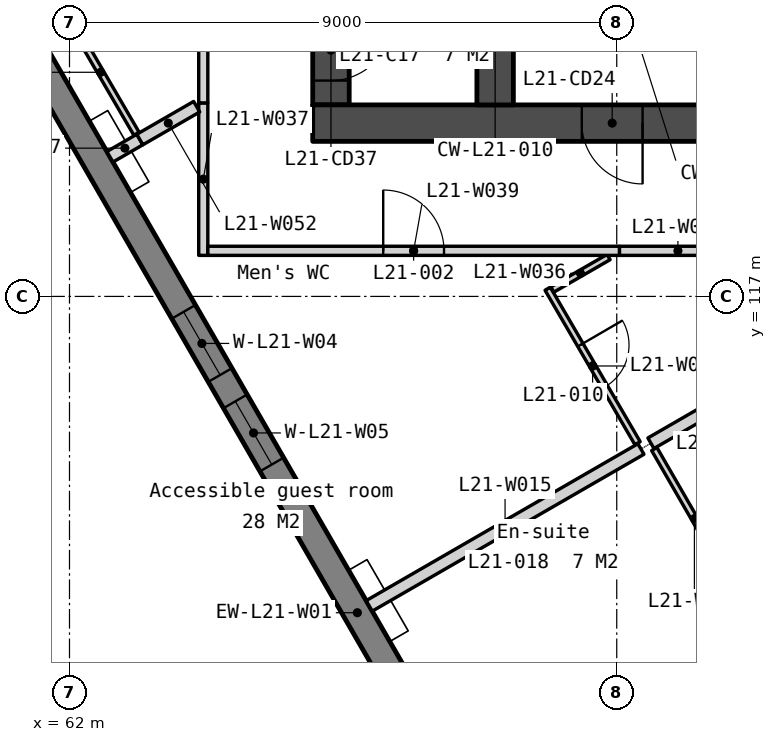
"""IFC4 building model, lengths in metres.
Left out: names, types, materials, properties, quantities, classifications, styles, units other than length and angle.
Written with IfcOpenShell. Run it as: python <this file> out.ifc"""

import sys

from ifc_helpers import new_model, si_unit, direction, frame, frame_2d, origin, place, context, subcontext, project, spatial, polyline, rectangle, outline, extrude, element, fill, save


model = new_model("IFC4")
c1 = context("Model", 3, precision=1e-05, world=origin(), true_north=direction((0.0, 1.0)))
c2 = subcontext(c1, "Body", "Model", "MODEL_VIEW")
j1 = project(units=[si_unit("LENGTHUNIT", "METRE"), si_unit("PLANEANGLEUNIT", "RADIAN")], contexts=[c1])
p1 = place(None, origin())
s1 = spatial("IfcSite", under=j1, at=p1, CompositionType="ELEMENT")
p2 = place(p1, origin())
s2 = spatial("IfcBuilding", under=s1, at=p2, CompositionType="ELEMENT")
p3 = place(p2, frame((0.0, 0.0, 88.8)))
s3 = spatial("IfcBuildingStorey", under=s2, at=p3, CompositionType="ELEMENT", Elevation=88.8)
p4 = place(p3, frame((66.3, 133.95, 0.0), z_axis=(0.0, 0.0, 1.0), x_axis=(0.0, -1.0, 0.0)))
e1 = element("IfcWall", 1, at=p4, inside=s3, PredefinedType="SOLIDWALL", context=c2, shape_type="SweptSolid", body=[
    extrude(rectangle(XDim=13.8, YDim=0.6, at=frame_2d((6.9, 0.0))), origin(), (0.0, 0.0, 1.0), 3.35),
])
p5 = place(p4, frame((0.6, 0.0, 0.0)))
e2 = element("IfcOpeningElement", 2, at=p5, cuts=e1, PredefinedType="OPENING", context=c2, shape_type="SweptSolid", body=[
    extrude(rectangle(XDim=1.1, YDim=2.1, at=frame_2d((0.55, 1.05))), frame((0.0, 0.31, 0.0), z_axis=(0.0, -1.0, 0.0), x_axis=(1.0, 0.0, 0.0)), (0.0, 0.0, 1.0), 0.62),
])
p6 = place(p4, frame((8.405, 0.0, 0.0)))
e3 = element("IfcOpeningElement", 3, at=p6, cuts=e1, PredefinedType="OPENING", context=c2, shape_type="SweptSolid", body=[
    extrude(rectangle(XDim=1.0, YDim=2.1, at=frame_2d((0.5, 1.05))), frame((0.0, 0.31, 0.0), z_axis=(0.0, -1.0, 0.0), x_axis=(1.0, 0.0, 0.0)), (0.0, 0.0, 1.0), 0.62),
])
p7 = place(p4, frame((10.355, 0.0, 0.0)))
e4 = element("IfcOpeningElement", 4, at=p7, cuts=e1, PredefinedType="OPENING", context=c2, shape_type="SweptSolid", body=[
    extrude(rectangle(XDim=1.0, YDim=2.1, at=frame_2d((0.5, 1.05))), frame((0.0, 0.31, 0.0), z_axis=(0.0, -1.0, 0.0), x_axis=(1.0, 0.0, 0.0)), (0.0, 0.0, 1.0), 0.62),
])
p8 = place(p4, frame((12.4, 0.0, 0.0)))
e5 = element("IfcOpeningElement", 5, at=p8, cuts=e1, PredefinedType="OPENING", context=c2, shape_type="SweptSolid", body=[
    extrude(rectangle(XDim=1.0, YDim=2.1, at=frame_2d((0.5, 1.05))), frame((0.0, 0.31, 0.0), z_axis=(0.0, -1.0, 0.0), x_axis=(1.0, 0.0, 0.0)), (0.0, 0.0, 1.0), 0.62),
])
p9 = place(p3, frame((66.0, 119.85, 0.0), z_axis=(0.0, 0.0, 1.0), x_axis=(1.0, 0.0, 0.0)))
e6 = element("IfcWall", 6, at=p9, inside=s3, PredefinedType="SOLIDWALL", context=c2, shape_type="SweptSolid", body=[
    extrude(rectangle(XDim=28.0, YDim=0.6, at=frame_2d((14.0, 0.0))), origin(), (0.0, 0.0, 1.0), 3.35),
])
p10 = place(p9, frame((6.825, 0.0, 0.0)))
e7 = element("IfcOpeningElement", 7, at=p10, cuts=e6, PredefinedType="OPENING", context=c2, shape_type="SweptSolid", body=[
    extrude(rectangle(XDim=1.8, YDim=2.1, at=frame_2d((0.9, 1.05))), frame((0.0, 0.31, 0.0), z_axis=(0.0, -1.0, 0.0), x_axis=(1.0, 0.0, 0.0)), (0.0, 0.0, 1.0), 0.62),
])
p11 = place(p9, frame((15.85, 0.0, 0.0)))
e8 = element("IfcOpeningElement", 8, at=p11, cuts=e6, PredefinedType="OPENING", context=c2, shape_type="SweptSolid", body=[
    extrude(rectangle(XDim=1.5, YDim=2.1, at=frame_2d((0.75, 1.05))), frame((0.0, 0.31, 0.0), z_axis=(0.0, -1.0, 0.0), x_axis=(1.0, 0.0, 0.0)), (0.0, 0.0, 1.0), 0.62),
])
p12 = place(p9, frame((19.375, 0.0, 0.0)))
e9 = element("IfcOpeningElement", 9, at=p12, cuts=e6, PredefinedType="OPENING", context=c2, shape_type="SweptSolid", body=[
    extrude(rectangle(XDim=1.8, YDim=2.1, at=frame_2d((0.9, 1.05))), frame((0.0, 0.31, 0.0), z_axis=(0.0, -1.0, 0.0), x_axis=(1.0, 0.0, 0.0)), (0.0, 0.0, 1.0), 0.62),
])
p13 = place(p9, frame((4.425, 0.0, 0.0)))
e10 = element("IfcOpeningElement", 10, at=p13, cuts=e6, PredefinedType="OPENING", context=c2, shape_type="SweptSolid", body=[
    extrude(rectangle(XDim=1.0, YDim=2.1, at=frame_2d((0.5, 1.05))), frame((0.0, 0.31, 0.0), z_axis=(0.0, -1.0, 0.0), x_axis=(1.0, 0.0, 0.0)), (0.0, 0.0, 1.0), 0.62),
])
p14 = place(p9, frame((9.783, 0.0, 0.0)))
e11 = element("IfcOpeningElement", 11, at=p14, cuts=e6, PredefinedType="OPENING", context=c2, shape_type="SweptSolid", body=[
    extrude(rectangle(XDim=1.0, YDim=2.1, at=frame_2d((0.5, 1.05))), frame((0.0, 0.31, 0.0), z_axis=(0.0, -1.0, 0.0), x_axis=(1.0, 0.0, 0.0)), (0.0, 0.0, 1.0), 0.62),
])
p15 = place(p9, frame((11.525, 0.0, 0.0)))
e12 = element("IfcOpeningElement", 12, at=p15, cuts=e6, PredefinedType="OPENING", context=c2, shape_type="SweptSolid", body=[
    extrude(rectangle(XDim=1.0, YDim=2.1, at=frame_2d((0.5, 1.05))), frame((0.0, 0.31, 0.0), z_axis=(0.0, -1.0, 0.0), x_axis=(1.0, 0.0, 0.0)), (0.0, 0.0, 1.0), 0.62),
])
p16 = place(p9, frame((13.658, 0.0, 0.0)))
e13 = element("IfcOpeningElement", 13, at=p16, cuts=e6, PredefinedType="OPENING", context=c2, shape_type="SweptSolid", body=[
    extrude(rectangle(XDim=1.0, YDim=2.1, at=frame_2d((0.5, 1.05))), frame((0.0, 0.31, 0.0), z_axis=(0.0, -1.0, 0.0), x_axis=(1.0, 0.0, 0.0)), (0.0, 0.0, 1.0), 0.62),
])
p17 = place(p9, frame((21.725, 0.0, 0.0)))
e14 = element("IfcOpeningElement", 14, at=p17, cuts=e6, PredefinedType="OPENING", context=c2, shape_type="SweptSolid", body=[
    extrude(rectangle(XDim=1.0, YDim=2.1, at=frame_2d((0.5, 1.05))), frame((0.0, 0.31, 0.0), z_axis=(0.0, -1.0, 0.0), x_axis=(1.0, 0.0, 0.0)), (0.0, 0.0, 1.0), 0.62),
])
p18 = place(p9, frame((23.425, 0.0, 0.0)))
e15 = element("IfcOpeningElement", 15, at=p18, cuts=e6, PredefinedType="OPENING", context=c2, shape_type="SweptSolid", body=[
    extrude(rectangle(XDim=1.0, YDim=2.1, at=frame_2d((0.5, 1.05))), frame((0.0, 0.31, 0.0), z_axis=(0.0, -1.0, 0.0), x_axis=(1.0, 0.0, 0.0)), (0.0, 0.0, 1.0), 0.62),
])
p19 = place(p3, frame((69.0, 122.25, 0.0), z_axis=(0.0, 0.0, 1.0), x_axis=(0.0, -1.0, 0.0)))
e16 = element("IfcWall", 16, at=p19, inside=s3, PredefinedType="SOLIDWALL", context=c2, shape_type="SweptSolid", body=[
    extrude(rectangle(XDim=2.1, YDim=0.6, at=frame_2d((1.05, 0.0))), origin(), (0.0, 0.0, 1.0), 3.35),
])
p20 = place(p3, frame((56.073, 130.263, -0.15), z_axis=(0.0, 0.0, 1.0), x_axis=(0.500000478905, -0.866025127289, 0.0)))
e17 = element("IfcWall", 17, at=p20, inside=s3, PredefinedType="SOLIDWALL", context=c2, shape_type="SweptSolid", body=[
    extrude(outline(polyline([(42.643, 0.0), (42.643, 3.5), (0.0, 3.5), (0.0, 0.0), (42.643, 0.0)])), frame((0.0, 0.225, 0.0), z_axis=(0.0, -1.0, 0.0), x_axis=(1.0, 0.0, 0.0)), (0.0, 0.0, 1.0), 0.45),
])
p21 = place(p20, frame((0.72, 0.0, 1.05)))
e18 = element("IfcOpeningElement", 18, at=p21, cuts=e17, PredefinedType="OPENING", context=c2, shape_type="SweptSolid", body=[
    extrude(rectangle(XDim=1.2, YDim=1.5, at=frame_2d((0.6, 0.75))), frame((0.0, 0.235, 0.0), z_axis=(0.0, -1.0, 0.0), x_axis=(1.0, 0.0, 0.0)), (0.0, 0.0, 1.0), 0.47),
])
p22 = place(p20, frame((7.079, 0.0, 1.05)))
e19 = element("IfcOpeningElement", 19, at=p22, cuts=e17, PredefinedType="OPENING", context=c2, shape_type="SweptSolid", body=[
    extrude(rectangle(XDim=1.2, YDim=1.5, at=frame_2d((0.6, 0.75))), frame((0.0, 0.235, 0.0), z_axis=(0.0, -1.0, 0.0), x_axis=(1.0, 0.0, 0.0)), (0.0, 0.0, 1.0), 0.47),
])
p23 = place(p20, frame((8.779, 0.0, 1.05)))
e20 = element("IfcOpeningElement", 20, at=p23, cuts=e17, PredefinedType="OPENING", context=c2, shape_type="SweptSolid", body=[
    extrude(rectangle(XDim=1.2, YDim=1.5, at=frame_2d((0.6, 0.75))), frame((0.0, 0.235, 0.0), z_axis=(0.0, -1.0, 0.0), x_axis=(1.0, 0.0, 0.0)), (0.0, 0.0, 1.0), 0.47),
])
p24 = place(p20, frame((15.607, 0.0, 1.05)))
e21 = element("IfcOpeningElement", 21, at=p24, cuts=e17, PredefinedType="OPENING", context=c2, shape_type="SweptSolid", body=[
    extrude(rectangle(XDim=1.2, YDim=1.5, at=frame_2d((0.6, 0.75))), frame((0.0, 0.235, 0.0), z_axis=(0.0, -1.0, 0.0), x_axis=(1.0, 0.0, 0.0)), (0.0, 0.0, 1.0), 0.47),
])
p25 = place(p20, frame((17.307, 0.0, 1.05)))
e22 = element("IfcOpeningElement", 22, at=p25, cuts=e17, PredefinedType="OPENING", context=c2, shape_type="SweptSolid", body=[
    extrude(rectangle(XDim=1.2, YDim=1.5, at=frame_2d((0.6, 0.75))), frame((0.0, 0.235, 0.0), z_axis=(0.0, -1.0, 0.0), x_axis=(1.0, 0.0, 0.0)), (0.0, 0.0, 1.0), 0.47),
])
p26 = place(p20, frame((24.136, 0.0, 1.05)))
e23 = element("IfcOpeningElement", 23, at=p26, cuts=e17, PredefinedType="OPENING", context=c2, shape_type="SweptSolid", body=[
    extrude(rectangle(XDim=1.2, YDim=1.5, at=frame_2d((0.6, 0.75))), frame((0.0, 0.235, 0.0), z_axis=(0.0, -1.0, 0.0), x_axis=(1.0, 0.0, 0.0)), (0.0, 0.0, 1.0), 0.47),
])
p27 = place(p20, frame((25.836, 0.0, 1.05)))
e24 = element("IfcOpeningElement", 24, at=p27, cuts=e17, PredefinedType="OPENING", context=c2, shape_type="SweptSolid", body=[
    extrude(rectangle(XDim=1.2, YDim=1.5, at=frame_2d((0.6, 0.75))), frame((0.0, 0.235, 0.0), z_axis=(0.0, -1.0, 0.0), x_axis=(1.0, 0.0, 0.0)), (0.0, 0.0, 1.0), 0.47),
])
p28 = place(p20, frame((32.665, 0.0, 1.05)))
e25 = element("IfcOpeningElement", 25, at=p28, cuts=e17, PredefinedType="OPENING", context=c2, shape_type="SweptSolid", body=[
    extrude(rectangle(XDim=1.2, YDim=1.5, at=frame_2d((0.6, 0.75))), frame((0.0, 0.235, 0.0), z_axis=(0.0, -1.0, 0.0), x_axis=(1.0, 0.0, 0.0)), (0.0, 0.0, 1.0), 0.47),
])
p29 = place(p20, frame((34.365, 0.0, 1.05)))
e26 = element("IfcOpeningElement", 26, at=p29, cuts=e17, PredefinedType="OPENING", context=c2, shape_type="SweptSolid", body=[
    extrude(rectangle(XDim=1.2, YDim=1.5, at=frame_2d((0.6, 0.75))), frame((0.0, 0.235, 0.0), z_axis=(0.0, -1.0, 0.0), x_axis=(1.0, 0.0, 0.0)), (0.0, 0.0, 1.0), 0.47),
])
p30 = place(p20, frame((40.722, 0.0, 1.05)))
e27 = element("IfcOpeningElement", 27, at=p30, cuts=e17, PredefinedType="OPENING", context=c2, shape_type="SweptSolid", body=[
    extrude(rectangle(XDim=1.2, YDim=1.5, at=frame_2d((0.6, 0.75))), frame((0.0, 0.235, 0.0), z_axis=(0.0, -1.0, 0.0), x_axis=(1.0, 0.0, 0.0)), (0.0, 0.0, 1.0), 0.47),
])
p31 = place(p3, frame((66.929, 111.91, 0.0), z_axis=(0.0, 0.0, 1.0), x_axis=(0.866021702275, 0.500006411147, 0.0)))
e28 = element("IfcWall", 28, at=p31, inside=s3, PredefinedType="PARTITIONING", context=c2, shape_type="SweptSolid", body=[
    extrude(rectangle(XDim=5.16, YDim=0.2, at=frame_2d((2.58, 0.0))), origin(), (0.0, 0.0, 1.0), 3.35),
])
p32 = place(p3, frame((71.617, 114.49, 0.0), z_axis=(0.0, 0.0, 1.0), x_axis=(0.500007957085, -0.86602080971, 0.0)))
e29 = element("IfcWall", 29, at=p32, inside=s3, PredefinedType="PARTITIONING", context=c2, shape_type="SweptSolid", body=[
    extrude(rectangle(XDim=2.64, YDim=0.1, at=frame_2d((1.32, 0.0))), origin(), (0.0, 0.0, 1.0), 3.35),
])
p33 = place(p3, frame((69.864, 117.126, 0.0), z_axis=(0.0, 0.0, 1.0), x_axis=(0.502920651267, -0.864332585599, 0.0)))
e30 = element("IfcWall", 30, at=p33, inside=s3, PredefinedType="PARTITIONING", context=c2, shape_type="SweptSolid", body=[
    extrude(rectangle(XDim=2.94, YDim=0.1, at=frame_2d((1.47, 0.0))), origin(), (0.0, 0.0, 1.0), 3.35),
])
p34 = place(p33, frame((1.07, 0.0, 0.0)))
e31 = element("IfcOpeningElement", 31, at=p34, cuts=e30, PredefinedType="OPENING", context=c2, shape_type="SweptSolid", body=[
    extrude(rectangle(XDim=0.8, YDim=2.1, at=frame_2d((0.4, 1.05))), frame((0.0, 0.06, 0.0), z_axis=(0.0, -1.0, 0.0), x_axis=(1.0, 0.0, 0.0)), (0.0, 0.0, 1.0), 0.12),
])
p35 = place(p3, frame((71.562, 114.585, 0.0), z_axis=(0.0, 0.0, 1.0), x_axis=(0.866020851292, 0.500007885066, 0.0)))
e32 = element("IfcWall", 32, at=p35, inside=s3, PredefinedType="PARTITIONING", context=c2, shape_type="SweptSolid", body=[
    extrude(rectangle(XDim=2.715, YDim=0.2, at=frame_2d((1.357, 0.0))), origin(), (0.0, 0.0, 1.0), 3.35),
])
p36 = place(p3, frame((69.941, 117.113, 0.0), z_axis=(0.0, 0.0, 1.0), x_axis=(0.866040989419, 0.499973003918, 0.0)))
e33 = element("IfcWall", 33, at=p36, inside=s3, PredefinedType="PARTITIONING", context=c2, shape_type="SweptSolid", body=[
    extrude(rectangle(XDim=1.068, YDim=0.1, at=frame_2d((0.534, 0.0))), origin(), (0.0, 0.0, 1.0), 3.35),
])
p37 = place(p3, frame((64.2, 117.675, 0.0), z_axis=(0.0, 0.0, 1.0), x_axis=(0.0, 1.0, 0.0)))
e34 = element("IfcWall", 34, at=p37, inside=s3, PredefinedType="PARTITIONING", context=c2, shape_type="SweptSolid", body=[
    extrude(rectangle(XDim=2.508, YDim=0.15, at=frame_2d((1.254, 0.0))), origin(), (0.0, 0.0, 1.0), 3.35),
])
p38 = place(p3, frame((71.044, 117.75, 0.0), z_axis=(0.0, 0.0, 1.0), x_axis=(1.0, 0.0, 0.0)))
e35 = element("IfcWall", 35, at=p38, inside=s3, PredefinedType="PARTITIONING", context=c2, shape_type="SweptSolid", body=[
    extrude(rectangle(XDim=1.925, YDim=0.15, at=frame_2d((0.962, 0.0))), origin(), (0.0, 0.0, 1.0), 3.35),
])
p39 = place(p3, frame((64.275, 117.75, 0.0), z_axis=(0.0, 0.0, 1.0), x_axis=(1.0, 0.0, 0.0)))
e36 = element("IfcWall", 36, at=p39, inside=s3, PredefinedType="PARTITIONING", context=c2, shape_type="SweptSolid", body=[
    extrude(rectangle(XDim=6.769, YDim=0.15, at=frame_2d((3.384, 0.0))), origin(), (0.0, 0.0, 1.0), 3.35),
])
p40 = place(p39, frame((2.884, 0.0, 0.0)))
e37 = element("IfcOpeningElement", 37, at=p40, cuts=e36, PredefinedType="OPENING", context=c2, shape_type="SweptSolid", body=[
    extrude(rectangle(XDim=1.0, YDim=2.1, at=frame_2d((0.5, 1.05))), frame((0.0, 0.085, 0.0), z_axis=(0.0, -1.0, 0.0), x_axis=(1.0, 0.0, 0.0)), (0.0, 0.0, 1.0), 0.17),
])
p41 = place(p3, frame((62.665, 119.296, 0.0), z_axis=(0.0, 0.0, 1.0), x_axis=(0.866121238764, 0.499833972197, 0.0)))
e38 = element("IfcWall", 38, at=p41, inside=s3, PredefinedType="PARTITIONING", context=c2, shape_type="SweptSolid", body=[
    extrude(rectangle(XDim=0.569, YDim=0.2, at=frame_2d((0.284, 0.0))), origin(), (0.0, 0.0, 1.0), 3.35),
])
p42 = place(p3, frame((61.923, 121.697, 0.0), z_axis=(0.0, 0.0, 1.0), x_axis=(0.503592070056, -0.863941564561, 0.0)))
e39 = element("IfcWall", 39, at=p42, inside=s3, PredefinedType="PARTITIONING", context=c2, shape_type="SweptSolid", body=[
    extrude(rectangle(XDim=2.34, YDim=0.1, at=frame_2d((1.17, 0.0))), origin(), (0.0, 0.0, 1.0), 3.35),
])
p43 = place(p3, frame((63.157, 119.581, 0.0), z_axis=(0.0, 0.0, 1.0), x_axis=(0.866091428368, 0.499885624626, 0.0)))
e40 = element("IfcWall", 40, at=p43, inside=s3, PredefinedType="PARTITIONING", context=c2, shape_type="SweptSolid", body=[
    extrude(rectangle(XDim=1.079, YDim=0.2, at=frame_2d((0.54, 0.0))), origin(), (0.0, 0.0, 1.0), 3.35),
])
p44 = place(p3, frame((64.2, 122.954, 0.0), z_axis=(0.0, 0.0, 1.0), x_axis=(0.0, -1.0, 0.0)))
e41 = element("IfcWall", 41, at=p44, inside=s3, PredefinedType="PARTITIONING", context=c2, shape_type="SweptSolid", body=[
    extrude(rectangle(XDim=2.771, YDim=0.15, at=frame_2d((1.386, 0.0))), origin(), (0.0, 0.0, 1.0), 3.35),
])
p45 = place(p13, origin())
e42 = element("IfcDoor", 42, at=p45, inside=s3, OperationType="SINGLE_SWING_RIGHT", PredefinedType="DOOR", context=c2, shape_type="SweptSolid", body=[
    extrude(rectangle(XDim=1.0, YDim=2.1, at=frame_2d((0.5, 1.05))), frame((0.0, 0.025, 0.0), z_axis=(0.0, -1.0, 0.0), x_axis=(1.0, 0.0, 0.0)), (0.0, 0.0, 1.0), 0.05),
])
fill(e10, e42)
p46 = place(p8, origin())
e43 = element("IfcDoor", 43, at=p46, inside=s3, OperationType="SINGLE_SWING_LEFT", PredefinedType="DOOR", context=c2, shape_type="SweptSolid", body=[
    extrude(rectangle(XDim=1.0, YDim=2.1, at=frame_2d((0.5, 1.05))), frame((0.0, 0.025, 0.0), z_axis=(0.0, -1.0, 0.0), x_axis=(1.0, 0.0, 0.0)), (0.0, 0.0, 1.0), 0.05),
])
fill(e5, e43)
p47 = place(p24, origin())
e44 = element("IfcWindow", 44, at=p47, inside=s3, PartitioningType="SINGLE_PANEL", PredefinedType="WINDOW", context=c2, shape_type="SweptSolid", body=[
    extrude(rectangle(XDim=1.2, YDim=1.5, at=frame_2d((0.6, 0.75))), frame((0.0, 0.03, 0.0), z_axis=(0.0, -1.0, 0.0), x_axis=(1.0, 0.0, 0.0)), (0.0, 0.0, 1.0), 0.06),
])
fill(e21, e44)
p48 = place(p25, origin())
e45 = element("IfcWindow", 45, at=p48, inside=s3, PartitioningType="SINGLE_PANEL", PredefinedType="WINDOW", context=c2, shape_type="SweptSolid", body=[
    extrude(rectangle(XDim=1.2, YDim=1.5, at=frame_2d((0.6, 0.75))), frame((0.0, 0.03, 0.0), z_axis=(0.0, -1.0, 0.0), x_axis=(1.0, 0.0, 0.0)), (0.0, 0.0, 1.0), 0.06),
])
fill(e22, e45)
p49 = place(p40, origin())
e46 = element("IfcDoor", 46, at=p49, inside=s3, OperationType="SINGLE_SWING_LEFT", PredefinedType="DOOR", context=c2, shape_type="SweptSolid", body=[
    extrude(rectangle(XDim=1.0, YDim=2.1, at=frame_2d((0.5, 1.05))), frame((0.0, 0.025, 0.0), z_axis=(0.0, -1.0, 0.0), x_axis=(1.0, 0.0, 0.0)), (0.0, 0.0, 1.0), 0.05),
])
fill(e37, e46)
p50 = place(p34, origin())
e47 = element("IfcDoor", 47, at=p50, inside=s3, OperationType="SINGLE_SWING_LEFT", PredefinedType="DOOR", context=c2, shape_type="SweptSolid", body=[
    extrude(rectangle(XDim=0.8, YDim=2.1, at=frame_2d((0.4, 1.05))), frame((0.0, 0.025, 0.0), z_axis=(0.0, -1.0, 0.0), x_axis=(1.0, 0.0, 0.0)), (0.0, 0.0, 1.0), 0.05),
])
fill(e31, e47)
save(model, sys.argv[1])
